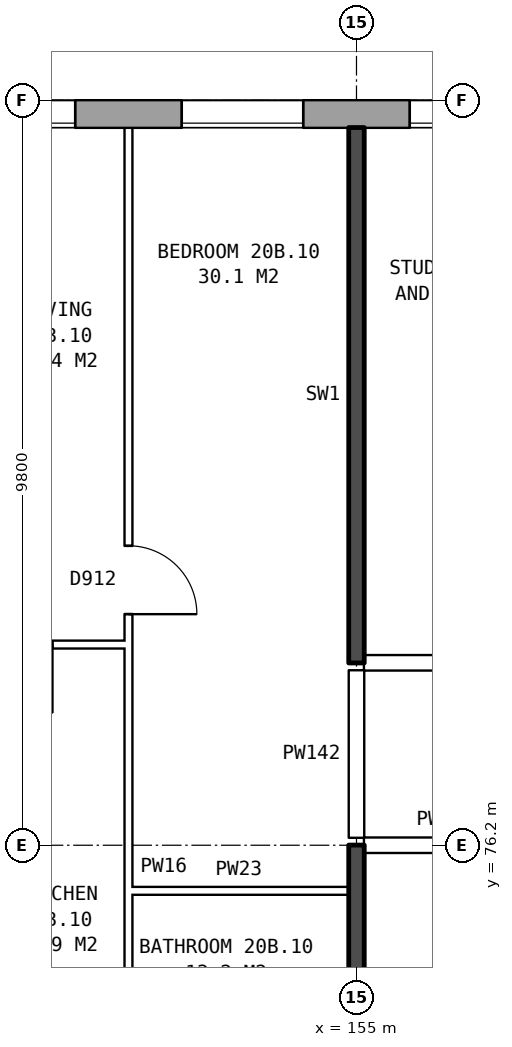
"""IFC4 building model, lengths in metres.
Left out: names, types, materials, properties, quantities, classifications, styles, units other than length and angle.
Written with IfcOpenShell. Run it as: python <this file> out.ifc"""

import sys

from ifc_helpers import new_model, si_unit, direction, frame, frame_2d, origin, place, context, subcontext, project, spatial, rectangle, extrude, element, fill, save


model = new_model("IFC4")
c1 = context("Model", 3, precision=1e-05, world=origin(), true_north=direction((0.0, 1.0)))
c2 = subcontext(c1, "Body", "Model", "MODEL_VIEW")
j1 = project(units=[si_unit("LENGTHUNIT", "METRE"), si_unit("PLANEANGLEUNIT", "RADIAN")], contexts=[c1])
p1 = place(None, origin())
s1 = spatial("IfcSite", under=j1, at=p1, CompositionType="ELEMENT")
p2 = place(p1, origin())
s2 = spatial("IfcBuilding", under=s1, at=p2, CompositionType="ELEMENT")
p3 = place(p2, frame((0.0, 0.0, 74.7)))
s3 = spatial("IfcBuildingStorey", under=s2, at=p3, CompositionType="ELEMENT", Elevation=74.7)
p4 = place(p3, frame((172.175, 85.82, 0.0), z_axis=(0.0, 0.0, 1.0), x_axis=(-1.0, 0.0, 0.0)))
e1 = element("IfcWall", 1, at=p4, inside=s3, PredefinedType="STANDARD", context=c2, shape_type="SweptSolid", body=[
    extrude(rectangle(XDim=38.101, YDim=0.36, at=frame_2d((19.05, 0.0))), origin(), (0.0, 0.0, 1.0), 2.85),
])
p5 = place(p4, frame((2.875, 0.0, 0.8)))
e2 = element("IfcOpeningElement", 2, at=p5, cuts=e1, PredefinedType="OPENING", context=c2, shape_type="SweptSolid", body=[
    extrude(rectangle(XDim=1.6, YDim=1.8, at=frame_2d((0.8, 0.9))), frame((0.0, 0.19, 0.0), z_axis=(0.0, -1.0, 0.0), x_axis=(1.0, 0.0, 0.0)), (0.0, 0.0, 1.0), 0.38),
])
p6 = place(p4, frame((6.525, 0.0, 0.8)))
e3 = element("IfcOpeningElement", 3, at=p6, cuts=e1, PredefinedType="OPENING", context=c2, shape_type="SweptSolid", body=[
    extrude(rectangle(XDim=0.6, YDim=0.9, at=frame_2d((0.3, 0.45))), frame((0.0, 0.19, 0.0), z_axis=(0.0, -1.0, 0.0), x_axis=(1.0, 0.0, 0.0)), (0.0, 0.0, 1.0), 0.38),
])
p7 = place(p4, frame((8.875, 0.0, 0.8)))
e4 = element("IfcOpeningElement", 4, at=p7, cuts=e1, PredefinedType="OPENING", context=c2, shape_type="SweptSolid", body=[
    extrude(rectangle(XDim=1.6, YDim=1.8, at=frame_2d((0.8, 0.9))), frame((0.0, 0.19, 0.0), z_axis=(0.0, -1.0, 0.0), x_axis=(1.0, 0.0, 0.0)), (0.0, 0.0, 1.0), 0.38),
])
p8 = place(p4, frame((11.875, 0.0, 0.8)))
e5 = element("IfcOpeningElement", 5, at=p8, cuts=e1, PredefinedType="OPENING", context=c2, shape_type="SweptSolid", body=[
    extrude(rectangle(XDim=1.6, YDim=1.8, at=frame_2d((0.8, 0.9))), frame((0.0, 0.19, 0.0), z_axis=(0.0, -1.0, 0.0), x_axis=(1.0, 0.0, 0.0)), (0.0, 0.0, 1.0), 0.38),
])
p9 = place(p4, frame((14.875, 0.0, 0.8)))
e6 = element("IfcOpeningElement", 6, at=p9, cuts=e1, PredefinedType="OPENING", context=c2, shape_type="SweptSolid", body=[
    extrude(rectangle(XDim=1.6, YDim=1.8, at=frame_2d((0.8, 0.9))), frame((0.0, 0.19, 0.0), z_axis=(0.0, -1.0, 0.0), x_axis=(1.0, 0.0, 0.0)), (0.0, 0.0, 1.0), 0.38),
])
p10 = place(p4, frame((17.875, 0.0, 0.8)))
e7 = element("IfcOpeningElement", 7, at=p10, cuts=e1, PredefinedType="OPENING", context=c2, shape_type="SweptSolid", body=[
    extrude(rectangle(XDim=1.6, YDim=1.8, at=frame_2d((0.8, 0.9))), frame((0.0, 0.19, 0.0), z_axis=(0.0, -1.0, 0.0), x_axis=(1.0, 0.0, 0.0)), (0.0, 0.0, 1.0), 0.38),
])
p11 = place(p4, frame((20.875, 0.0, 0.8)))
e8 = element("IfcOpeningElement", 8, at=p11, cuts=e1, PredefinedType="OPENING", context=c2, shape_type="SweptSolid", body=[
    extrude(rectangle(XDim=1.6, YDim=1.8, at=frame_2d((0.8, 0.9))), frame((0.0, 0.19, 0.0), z_axis=(0.0, -1.0, 0.0), x_axis=(1.0, 0.0, 0.0)), (0.0, 0.0, 1.0), 0.38),
])
p12 = place(p4, frame((23.875, 0.0, 0.8)))
e9 = element("IfcOpeningElement", 9, at=p12, cuts=e1, PredefinedType="OPENING", context=c2, shape_type="SweptSolid", body=[
    extrude(rectangle(XDim=1.6, YDim=1.8, at=frame_2d((0.8, 0.9))), frame((0.0, 0.19, 0.0), z_axis=(0.0, -1.0, 0.0), x_axis=(1.0, 0.0, 0.0)), (0.0, 0.0, 1.0), 0.38),
])
p13 = place(p4, frame((26.875, 0.0, 0.8)))
e10 = element("IfcOpeningElement", 10, at=p13, cuts=e1, PredefinedType="OPENING", context=c2, shape_type="SweptSolid", body=[
    extrude(rectangle(XDim=1.6, YDim=1.8, at=frame_2d((0.8, 0.9))), frame((0.0, 0.19, 0.0), z_axis=(0.0, -1.0, 0.0), x_axis=(1.0, 0.0, 0.0)), (0.0, 0.0, 1.0), 0.38),
])
p14 = place(p4, frame((29.375, 0.0, 0.8)))
e11 = element("IfcOpeningElement", 11, at=p14, cuts=e1, PredefinedType="OPENING", context=c2, shape_type="SweptSolid", body=[
    extrude(rectangle(XDim=1.2, YDim=1.8, at=frame_2d((0.6, 0.9))), frame((0.0, 0.19, 0.0), z_axis=(0.0, -1.0, 0.0), x_axis=(1.0, 0.0, 0.0)), (0.0, 0.0, 1.0), 0.38),
])
p15 = place(p4, frame((30.875, 0.0, 0.8)))
e12 = element("IfcOpeningElement", 12, at=p15, cuts=e1, PredefinedType="OPENING", context=c2, shape_type="SweptSolid", body=[
    extrude(rectangle(XDim=0.6, YDim=0.9, at=frame_2d((0.3, 0.45))), frame((0.0, 0.19, 0.0), z_axis=(0.0, -1.0, 0.0), x_axis=(1.0, 0.0, 0.0)), (0.0, 0.0, 1.0), 0.38),
])
p16 = place(p4, frame((35.875, 0.0, 0.8)))
e13 = element("IfcOpeningElement", 13, at=p16, cuts=e1, PredefinedType="OPENING", context=c2, shape_type="SweptSolid", body=[
    extrude(rectangle(XDim=1.6, YDim=1.8, at=frame_2d((0.8, 0.9))), frame((0.0, 0.19, 0.0), z_axis=(0.0, -1.0, 0.0), x_axis=(1.0, 0.0, 0.0)), (0.0, 0.0, 1.0), 0.38),
])
p17 = place(p4, frame((7.425, 0.0, 0.8)))
e14 = element("IfcOpeningElement", 14, at=p17, cuts=e1, PredefinedType="OPENING", context=c2, shape_type="SweptSolid", body=[
    extrude(rectangle(XDim=1.0, YDim=1.8, at=frame_2d((0.5, 0.9))), frame((0.0, 0.19, 0.0), z_axis=(0.0, -1.0, 0.0), x_axis=(1.0, 0.0, 0.0)), (0.0, 0.0, 1.0), 0.38),
])
p18 = place(p4, frame((32.725, 0.0, 1.7)))
e15 = element("IfcOpeningElement", 15, at=p18, cuts=e1, PredefinedType="OPENING", context=c2, shape_type="SweptSolid", body=[
    extrude(rectangle(XDim=0.6, YDim=0.9, at=frame_2d((0.3, 0.45))), frame((0.0, 0.19, 0.0), z_axis=(0.0, -1.0, 0.0), x_axis=(1.0, 0.0, 0.0)), (0.0, 0.0, 1.0), 0.38),
])
p19 = place(p4, frame((33.625, 0.0, 0.8)))
e16 = element("IfcOpeningElement", 16, at=p19, cuts=e1, PredefinedType="OPENING", context=c2, shape_type="SweptSolid", body=[
    extrude(rectangle(XDim=1.2, YDim=1.8, at=frame_2d((0.6, 0.9))), frame((0.0, 0.19, 0.0), z_axis=(0.0, -1.0, 0.0), x_axis=(1.0, 0.0, 0.0)), (0.0, 0.0, 1.0), 0.38),
])
p20 = place(p3, frame((152.0, 75.6, 0.0), z_axis=(0.0, 0.0, 1.0), x_axis=(1.0, 0.0, 0.0)))
e17 = element("IfcWall", 17, at=p20, inside=s3, PredefinedType="PARTITIONING", context=c2, shape_type="SweptSolid", body=[
    extrude(rectangle(XDim=2.9, YDim=0.1, at=frame_2d((1.45, 0.0))), origin(), (0.0, 0.0, 1.0), 2.85),
])
p21 = place(p3, frame((155.1, 76.2, 0.0), z_axis=(0.0, 0.0, 1.0), x_axis=(1.0, 0.0, 0.0)))
e18 = element("IfcWall", 18, at=p21, inside=s3, PredefinedType="PARTITIONING", context=c2, shape_type="SweptSolid", body=[
    extrude(rectangle(XDim=2.14, YDim=0.2, at=frame_2d((1.07, 0.0))), origin(), (0.0, 0.0, 1.0), 2.85),
])
p22 = place(p3, frame((155.1, 78.6, 0.0), z_axis=(0.0, 0.0, 1.0), x_axis=(1.0, 0.0, 0.0)))
e19 = element("IfcWall", 19, at=p22, inside=s3, PredefinedType="PARTITIONING", context=c2, shape_type="SweptSolid", body=[
    extrude(rectangle(XDim=19.79, YDim=0.2, at=frame_2d((9.895, 0.0))), origin(), (0.0, 0.0, 1.0), 2.85),
])
p23 = place(p22, frame((1.45, 0.0, 0.0)))
e20 = element("IfcOpeningElement", 20, at=p23, cuts=e19, PredefinedType="OPENING", context=c2, shape_type="SweptSolid", body=[
    extrude(rectangle(XDim=1.0, YDim=2.1, at=frame_2d((0.5, 1.05))), frame((0.0, 0.11, 0.0), z_axis=(0.0, -1.0, 0.0), x_axis=(1.0, 0.0, 0.0)), (0.0, 0.0, 1.0), 0.22),
])
p24 = place(p22, frame((9.6, 0.0, 0.0)))
e21 = element("IfcOpeningElement", 21, at=p24, cuts=e19, PredefinedType="OPENING", context=c2, shape_type="SweptSolid", body=[
    extrude(rectangle(XDim=1.0, YDim=2.1, at=frame_2d((0.5, 1.05))), frame((0.0, 0.11, 0.0), z_axis=(0.0, -1.0, 0.0), x_axis=(1.0, 0.0, 0.0)), (0.0, 0.0, 1.0), 0.22),
])
p25 = place(p22, frame((13.2, 0.0, 0.0)))
e22 = element("IfcOpeningElement", 22, at=p25, cuts=e19, PredefinedType="OPENING", context=c2, shape_type="SweptSolid", body=[
    extrude(rectangle(XDim=1.0, YDim=2.1, at=frame_2d((0.5, 1.05))), frame((0.0, 0.11, 0.0), z_axis=(0.0, -1.0, 0.0), x_axis=(1.0, 0.0, 0.0)), (0.0, 0.0, 1.0), 0.22),
])
p26 = place(p3, frame((149.1, 78.84, 0.0), z_axis=(0.0, 0.0, 1.0), x_axis=(1.0, 0.0, 0.0)))
e23 = element("IfcWall", 23, at=p26, inside=s3, PredefinedType="PARTITIONING", context=c2, shape_type="SweptSolid", body=[
    extrude(rectangle(XDim=2.9, YDim=0.1, at=frame_2d((1.45, 0.0))), origin(), (0.0, 0.0, 1.0), 2.85),
])
p27 = place(p26, frame((1.0, 0.0, 0.0)))
e24 = element("IfcOpeningElement", 24, at=p27, cuts=e23, PredefinedType="OPENING", context=c2, shape_type="SweptSolid", body=[
    extrude(rectangle(XDim=0.9, YDim=2.1, at=frame_2d((0.45, 1.05))), frame((0.0, 0.06, 0.0), z_axis=(0.0, -1.0, 0.0), x_axis=(1.0, 0.0, 0.0)), (0.0, 0.0, 1.0), 0.12),
])
p28 = place(p3, frame((152.0, 71.3, 0.0), z_axis=(0.0, 0.0, 1.0), x_axis=(0.0, 1.0, 0.0)))
e25 = element("IfcWall", 25, at=p28, inside=s3, PredefinedType="PARTITIONING", context=c2, shape_type="SweptSolid", body=[
    extrude(rectangle(XDim=14.34, YDim=0.1, at=frame_2d((7.17, 0.0))), origin(), (0.0, 0.0, 1.0), 2.85),
])
p29 = place(p28, frame((7.94, 0.0, 0.0)))
e26 = element("IfcOpeningElement", 26, at=p29, cuts=e25, PredefinedType="OPENING", context=c2, shape_type="SweptSolid", body=[
    extrude(rectangle(XDim=0.9, YDim=2.1, at=frame_2d((0.45, 1.05))), frame((0.0, 0.06, 0.0), z_axis=(0.0, -1.0, 0.0), x_axis=(1.0, 0.0, 0.0)), (0.0, 0.0, 1.0), 0.12),
])
p30 = place(p28, frame((0.4, 0.0, 0.0)))
e27 = element("IfcOpeningElement", 27, at=p30, cuts=e25, PredefinedType="OPENING", context=c2, shape_type="SweptSolid", body=[
    extrude(rectangle(XDim=0.9, YDim=2.1, at=frame_2d((0.45, 1.05))), frame((0.0, 0.06, 0.0), z_axis=(0.0, -1.0, 0.0), x_axis=(1.0, 0.0, 0.0)), (0.0, 0.0, 1.0), 0.12),
])
p31 = place(p3, frame((155.0, 71.2, 0.0), z_axis=(0.0, 0.0, 1.0), x_axis=(0.0, 1.0, 0.0)))
e28 = element("IfcWall", 28, at=p31, inside=s3, PredefinedType="SOLIDWALL", context=c2, shape_type="SweptSolid", body=[
    extrude(rectangle(XDim=5.0, YDim=0.2, at=frame_2d((2.5, 0.0))), origin(), (0.0, 0.0, 1.0), 2.85),
])
p32 = place(p3, frame((155.0, 76.3, 0.0), z_axis=(0.0, 0.0, 1.0), x_axis=(0.0, 1.0, 0.0)))
e29 = element("IfcWall", 29, at=p32, inside=s3, PredefinedType="PARTITIONING", context=c2, shape_type="SweptSolid", body=[
    extrude(rectangle(XDim=2.2, YDim=0.2, at=frame_2d((1.1, 0.0))), origin(), (0.0, 0.0, 1.0), 2.85),
])
p33 = place(p3, frame((155.0, 78.6, 0.0), z_axis=(0.0, 0.0, 1.0), x_axis=(0.0, 1.0, 0.0)))
e30 = element("IfcWall", 30, at=p33, inside=s3, PredefinedType="SOLIDWALL", context=c2, shape_type="SweptSolid", body=[
    extrude(rectangle(XDim=7.04, YDim=0.2, at=frame_2d((3.52, 0.0))), origin(), (0.0, 0.0, 1.0), 2.85),
])
p34 = place(p9, origin())
e31 = element("IfcWindow", 31, at=p34, inside=s3, PartitioningType="SINGLE_PANEL", PredefinedType="WINDOW", context=c2, shape_type="SweptSolid", body=[
    extrude(rectangle(XDim=1.6, YDim=1.8, at=frame_2d((0.8, 0.9))), frame((0.0, 0.15, 0.0), z_axis=(0.0, -1.0, 0.0), x_axis=(1.0, 0.0, 0.0)), (0.0, 0.0, 1.0), 0.06),
])
fill(e6, e31)
p35 = place(p10, origin())
e32 = element("IfcWindow", 32, at=p35, inside=s3, PartitioningType="SINGLE_PANEL", PredefinedType="WINDOW", context=c2, shape_type="SweptSolid", body=[
    extrude(rectangle(XDim=1.6, YDim=1.8, at=frame_2d((0.8, 0.9))), frame((0.0, 0.15, 0.0), z_axis=(0.0, -1.0, 0.0), x_axis=(1.0, 0.0, 0.0)), (0.0, 0.0, 1.0), 0.06),
])
fill(e7, e32)
p36 = place(p11, origin())
e33 = element("IfcWindow", 33, at=p36, inside=s3, PartitioningType="SINGLE_PANEL", PredefinedType="WINDOW", context=c2, shape_type="SweptSolid", body=[
    extrude(rectangle(XDim=1.6, YDim=1.8, at=frame_2d((0.8, 0.9))), frame((0.0, 0.15, 0.0), z_axis=(0.0, -1.0, 0.0), x_axis=(1.0, 0.0, 0.0)), (0.0, 0.0, 1.0), 0.06),
])
fill(e8, e33)
p37 = place(p29, frame((0.9, 0.0, 0.0), z_axis=(0.0, 0.0, 1.0), x_axis=(-1.0, 0.0, 0.0)))
e34 = element("IfcDoor", 34, at=p37, inside=s3, OperationType="SINGLE_SWING_RIGHT", PredefinedType="DOOR", context=c2, shape_type="SweptSolid", body=[
    extrude(rectangle(XDim=0.9, YDim=2.1, at=frame_2d((0.45, 1.05))), frame((0.0, 0.025, 0.0), z_axis=(0.0, -1.0, 0.0), x_axis=(1.0, 0.0, 0.0)), (0.0, 0.0, 1.0), 0.05),
])
fill(e26, e34)
save(model, sys.argv[1])
